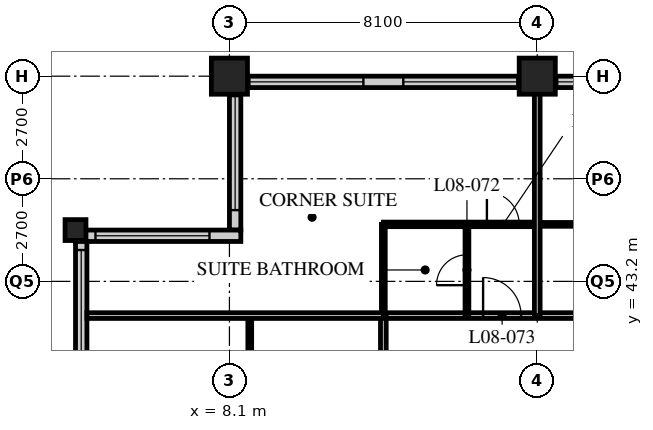
"""IFC4 building model, lengths in metres.
Left out: names, types, materials, properties, quantities, classifications, styles, units other than length and angle.
Written with IfcOpenShell. Run it as: python <this file> out.ifc"""

import sys

from ifc_helpers import new_model, si_unit, direction, frame, frame_2d, origin, origin_2d, place, context, subcontext, project, spatial, rectangle, hollow_rectangle, extrude, element, fill, save


model = new_model("IFC4")
c1 = context("Model", 3, precision=1e-05, world=origin(), true_north=direction((0.0, 1.0)))
c2 = subcontext(c1, "Body", "Model", "MODEL_VIEW")
j1 = project(units=[si_unit("LENGTHUNIT", "METRE"), si_unit("PLANEANGLEUNIT", "RADIAN")], contexts=[c1])
p1 = place(None, origin())
s1 = spatial("IfcSite", under=j1, at=p1, CompositionType="ELEMENT")
p2 = place(p1, origin())
s2 = spatial("IfcBuilding", under=s1, at=p2, CompositionType="ELEMENT")
p3 = place(p2, frame((0.0, 0.0, 39.8)))
s3 = spatial("IfcBuildingStorey", under=s2, at=p3, CompositionType="ELEMENT", Elevation=39.8)
p4 = place(p3, frame((4.05, 44.55, 0.0), z_axis=(0.0, 0.0, 1.0), x_axis=(1.0, 0.0, 0.0)))
e1 = element("IfcColumn", 1, at=p4, inside=s3, PredefinedType="COLUMN", context=c2, shape_type="SweptSolid", body=[
    extrude(hollow_rectangle(XDim=0.55, YDim=0.55, WallThickness=0.05, at=origin_2d()), origin(), (0.0, 0.0, 1.0), 3.4),
])
for number, where, z_axis, x_axis in (
    (2, (8.1, 48.6, 0.0), (0.0, 0.0, 1.0), (1.0, 0.0, 0.0)),
    (3, (16.2, 48.6, 0.0), (0.0, 0.0, 1.0), (1.0, 0.0, 0.0)),
):
    element("IfcColumn", number, at=place(p3, frame(where, z_axis=z_axis, x_axis=x_axis)), inside=s3, PredefinedType="COLUMN", context=c2, shape_type="SweptSolid", body=[
        extrude(hollow_rectangle(XDim=0.95, YDim=0.95, WallThickness=0.095, at=origin_2d()), origin(), (0.0, 0.0, 1.0), 3.4),
    ])
p5 = place(p3, frame((48.3, 48.45, 0.0), z_axis=(0.0, 0.0, 1.0), x_axis=(-1.0, 0.0, 0.0)))
e4 = element("IfcWall", 4, at=p5, inside=s3, PredefinedType="SOLIDWALL", context=c2, shape_type="SweptSolid", body=[
    extrude(rectangle(XDim=40.2, YDim=0.3, at=frame_2d((20.1, 0.0))), origin(), (0.0, 0.0, 1.0), 3.19),
])
p6 = place(p5, frame((0.225, 0.0, 0.9)))
e5 = element("IfcOpeningElement", 5, at=p6, cuts=e4, PredefinedType="OPENING", context=c2, shape_type="SweptSolid", body=[
    extrude(rectangle(XDim=3.0, YDim=2.0, at=frame_2d((1.5, 1.0))), frame((0.0, 0.16, 0.0), z_axis=(0.0, -1.0, 0.0), x_axis=(1.0, 0.0, 0.0)), (0.0, 0.0, 1.0), 0.32),
])
p7 = place(p5, frame((4.275, 0.0, 0.9)))
e6 = element("IfcOpeningElement", 6, at=p7, cuts=e4, PredefinedType="OPENING", context=c2, shape_type="SweptSolid", body=[
    extrude(rectangle(XDim=3.0, YDim=2.0, at=frame_2d((1.5, 1.0))), frame((0.0, 0.16, 0.0), z_axis=(0.0, -1.0, 0.0), x_axis=(1.0, 0.0, 0.0)), (0.0, 0.0, 1.0), 0.32),
])
p8 = place(p5, frame((8.325, 0.0, 0.9)))
e7 = element("IfcOpeningElement", 7, at=p8, cuts=e4, PredefinedType="OPENING", context=c2, shape_type="SweptSolid", body=[
    extrude(rectangle(XDim=3.0, YDim=2.0, at=frame_2d((1.5, 1.0))), frame((0.0, 0.16, 0.0), z_axis=(0.0, -1.0, 0.0), x_axis=(1.0, 0.0, 0.0)), (0.0, 0.0, 1.0), 0.32),
])
p9 = place(p5, frame((12.375, 0.0, 0.9)))
e8 = element("IfcOpeningElement", 8, at=p9, cuts=e4, PredefinedType="OPENING", context=c2, shape_type="SweptSolid", body=[
    extrude(rectangle(XDim=3.0, YDim=2.0, at=frame_2d((1.5, 1.0))), frame((0.0, 0.16, 0.0), z_axis=(0.0, -1.0, 0.0), x_axis=(1.0, 0.0, 0.0)), (0.0, 0.0, 1.0), 0.32),
])
p10 = place(p5, frame((16.425, 0.0, 0.9)))
e9 = element("IfcOpeningElement", 9, at=p10, cuts=e4, PredefinedType="OPENING", context=c2, shape_type="SweptSolid", body=[
    extrude(rectangle(XDim=3.0, YDim=2.0, at=frame_2d((1.5, 1.0))), frame((0.0, 0.16, 0.0), z_axis=(0.0, -1.0, 0.0), x_axis=(1.0, 0.0, 0.0)), (0.0, 0.0, 1.0), 0.32),
])
p11 = place(p5, frame((20.475, 0.0, 0.9)))
e10 = element("IfcOpeningElement", 10, at=p11, cuts=e4, PredefinedType="OPENING", context=c2, shape_type="SweptSolid", body=[
    extrude(rectangle(XDim=3.0, YDim=2.0, at=frame_2d((1.5, 1.0))), frame((0.0, 0.16, 0.0), z_axis=(0.0, -1.0, 0.0), x_axis=(1.0, 0.0, 0.0)), (0.0, 0.0, 1.0), 0.32),
])
p12 = place(p5, frame((24.525, 0.0, 0.9)))
e11 = element("IfcOpeningElement", 11, at=p12, cuts=e4, PredefinedType="OPENING", context=c2, shape_type="SweptSolid", body=[
    extrude(rectangle(XDim=3.0, YDim=2.0, at=frame_2d((1.5, 1.0))), frame((0.0, 0.16, 0.0), z_axis=(0.0, -1.0, 0.0), x_axis=(1.0, 0.0, 0.0)), (0.0, 0.0, 1.0), 0.32),
])
p13 = place(p5, frame((28.575, 0.0, 0.9)))
e12 = element("IfcOpeningElement", 12, at=p13, cuts=e4, PredefinedType="OPENING", context=c2, shape_type="SweptSolid", body=[
    extrude(rectangle(XDim=3.0, YDim=2.0, at=frame_2d((1.5, 1.0))), frame((0.0, 0.16, 0.0), z_axis=(0.0, -1.0, 0.0), x_axis=(1.0, 0.0, 0.0)), (0.0, 0.0, 1.0), 0.32),
])
p14 = place(p5, frame((32.625, 0.0, 0.9)))
e13 = element("IfcOpeningElement", 13, at=p14, cuts=e4, PredefinedType="OPENING", context=c2, shape_type="SweptSolid", body=[
    extrude(rectangle(XDim=3.0, YDim=2.0, at=frame_2d((1.5, 1.0))), frame((0.0, 0.16, 0.0), z_axis=(0.0, -1.0, 0.0), x_axis=(1.0, 0.0, 0.0)), (0.0, 0.0, 1.0), 0.32),
])
p15 = place(p5, frame((36.675, 0.0, 0.9)))
e14 = element("IfcOpeningElement", 14, at=p15, cuts=e4, PredefinedType="OPENING", context=c2, shape_type="SweptSolid", body=[
    extrude(rectangle(XDim=3.0, YDim=2.0, at=frame_2d((1.5, 1.0))), frame((0.0, 0.16, 0.0), z_axis=(0.0, -1.0, 0.0), x_axis=(1.0, 0.0, 0.0)), (0.0, 0.0, 1.0), 0.32),
])
p16 = place(p3, frame((8.25, 48.3, 0.0), z_axis=(0.0, 0.0, 1.0), x_axis=(0.0, -1.0, 0.0)))
e15 = element("IfcWall", 15, at=p16, inside=s3, PredefinedType="SOLIDWALL", context=c2, shape_type="SweptSolid", body=[
    extrude(rectangle(XDim=3.75, YDim=0.3, at=frame_2d((1.875, 0.0))), origin(), (0.0, 0.0, 1.0), 3.19),
])
p17 = place(p16, frame((0.225, 0.0, 0.9)))
e16 = element("IfcOpeningElement", 16, at=p17, cuts=e15, PredefinedType="OPENING", context=c2, shape_type="SweptSolid", body=[
    extrude(rectangle(XDim=3.0, YDim=1.5, at=frame_2d((1.5, 0.75))), frame((0.0, 0.16, 0.0), z_axis=(0.0, -1.0, 0.0), x_axis=(1.0, 0.0, 0.0)), (0.0, 0.0, 1.0), 0.32),
])
p18 = place(p3, frame((8.4, 44.4, 0.0), z_axis=(0.0, 0.0, 1.0), x_axis=(-1.0, 0.0, 0.0)))
e17 = element("IfcWall", 17, at=p18, inside=s3, PredefinedType="SOLIDWALL", context=c2, shape_type="SweptSolid", body=[
    extrude(rectangle(XDim=4.35, YDim=0.3, at=frame_2d((2.175, 0.0))), origin(), (0.0, 0.0, 1.0), 3.19),
])
p19 = place(p18, frame((0.825, 0.0, 0.9)))
e18 = element("IfcOpeningElement", 18, at=p19, cuts=e17, PredefinedType="OPENING", context=c2, shape_type="SweptSolid", body=[
    extrude(rectangle(XDim=3.0, YDim=1.5, at=frame_2d((1.5, 0.75))), frame((0.0, 0.16, 0.0), z_axis=(0.0, -1.0, 0.0), x_axis=(1.0, 0.0, 0.0)), (0.0, 0.0, 1.0), 0.32),
])
p20 = place(p3, frame((4.2, 44.25, 0.0), z_axis=(0.0, 0.0, 1.0), x_axis=(0.0, -1.0, 0.0)))
e19 = element("IfcWall", 19, at=p20, inside=s3, PredefinedType="SOLIDWALL", context=c2, shape_type="SweptSolid", body=[
    extrude(rectangle(XDim=3.75, YDim=0.3, at=frame_2d((1.875, 0.0))), origin(), (0.0, 0.0, 1.0), 3.19),
])
p21 = place(p20, frame((0.225, 0.0, 0.9)))
e20 = element("IfcOpeningElement", 20, at=p21, cuts=e19, PredefinedType="OPENING", context=c2, shape_type="SweptSolid", body=[
    extrude(rectangle(XDim=3.0, YDim=1.5, at=frame_2d((1.5, 0.75))), frame((0.0, 0.16, 0.0), z_axis=(0.0, -1.0, 0.0), x_axis=(1.0, 0.0, 0.0)), (0.0, 0.0, 1.0), 0.32),
])
p22 = place(p3, frame((12.15, 42.3, 0.0), z_axis=(0.0, 0.0, 1.0), x_axis=(1.0, 0.0, 0.0)))
e21 = element("IfcWall", 21, at=p22, inside=s3, PredefinedType="PARTITIONING", context=c2, shape_type="SweptSolid", body=[
    extrude(rectangle(XDim=32.4, YDim=0.15, at=frame_2d((16.2, 0.0))), origin(), (0.0, 0.0, 1.0), 3.19),
])
p23 = place(p22, frame((6.5, 0.0, 0.0)))
e22 = element("IfcOpeningElement", 22, at=p23, cuts=e21, PredefinedType="OPENING", context=c2, shape_type="SweptSolid", body=[
    extrude(rectangle(XDim=1.0, YDim=2.1, at=frame_2d((0.5, 1.05))), frame((0.0, 0.085, 0.0), z_axis=(0.0, -1.0, 0.0), x_axis=(1.0, 0.0, 0.0)), (0.0, 0.0, 1.0), 0.17),
])
p24 = place(p22, frame((8.4, 0.0, 0.0)))
e23 = element("IfcOpeningElement", 23, at=p24, cuts=e21, PredefinedType="OPENING", context=c2, shape_type="SweptSolid", body=[
    extrude(rectangle(XDim=1.0, YDim=2.1, at=frame_2d((0.5, 1.05))), frame((0.0, 0.085, 0.0), z_axis=(0.0, -1.0, 0.0), x_axis=(1.0, 0.0, 0.0)), (0.0, 0.0, 1.0), 0.17),
])
p25 = place(p22, frame((14.6, 0.0, 0.0)))
e24 = element("IfcOpeningElement", 24, at=p25, cuts=e21, PredefinedType="OPENING", context=c2, shape_type="SweptSolid", body=[
    extrude(rectangle(XDim=1.0, YDim=2.1, at=frame_2d((0.5, 1.05))), frame((0.0, 0.085, 0.0), z_axis=(0.0, -1.0, 0.0), x_axis=(1.0, 0.0, 0.0)), (0.0, 0.0, 1.0), 0.17),
])
p26 = place(p22, frame((18.65, 0.0, 0.0)))
e25 = element("IfcOpeningElement", 25, at=p26, cuts=e21, PredefinedType="OPENING", context=c2, shape_type="SweptSolid", body=[
    extrude(rectangle(XDim=1.0, YDim=2.1, at=frame_2d((0.5, 1.05))), frame((0.0, 0.085, 0.0), z_axis=(0.0, -1.0, 0.0), x_axis=(1.0, 0.0, 0.0)), (0.0, 0.0, 1.0), 0.17),
])
p27 = place(p22, frame((23.0, 0.0, 0.0)))
e26 = element("IfcOpeningElement", 26, at=p27, cuts=e21, PredefinedType="OPENING", context=c2, shape_type="SweptSolid", body=[
    extrude(rectangle(XDim=1.0, YDim=2.1, at=frame_2d((0.5, 1.05))), frame((0.0, 0.085, 0.0), z_axis=(0.0, -1.0, 0.0), x_axis=(1.0, 0.0, 0.0)), (0.0, 0.0, 1.0), 0.17),
])
p28 = place(p22, frame((26.75, 0.0, 0.0)))
e27 = element("IfcOpeningElement", 27, at=p28, cuts=e21, PredefinedType="OPENING", context=c2, shape_type="SweptSolid", body=[
    extrude(rectangle(XDim=1.0, YDim=2.1, at=frame_2d((0.5, 1.05))), frame((0.0, 0.085, 0.0), z_axis=(0.0, -1.0, 0.0), x_axis=(1.0, 0.0, 0.0)), (0.0, 0.0, 1.0), 0.17),
])
p29 = place(p22, frame((28.775, 0.0, 0.0)))
e28 = element("IfcOpeningElement", 28, at=p29, cuts=e21, PredefinedType="OPENING", context=c2, shape_type="SweptSolid", body=[
    extrude(rectangle(XDim=1.0, YDim=2.1, at=frame_2d((0.5, 1.05))), frame((0.0, 0.085, 0.0), z_axis=(0.0, -1.0, 0.0), x_axis=(1.0, 0.0, 0.0)), (0.0, 0.0, 1.0), 0.17),
])
p30 = place(p22, frame((2.625, 0.0, 0.0)))
e29 = element("IfcOpeningElement", 29, at=p30, cuts=e21, PredefinedType="OPENING", context=c2, shape_type="SweptSolid", body=[
    extrude(rectangle(XDim=1.0, YDim=2.1, at=frame_2d((0.5, 1.05))), frame((0.0, 0.085, 0.0), z_axis=(0.0, -1.0, 0.0), x_axis=(1.0, 0.0, 0.0)), (0.0, 0.0, 1.0), 0.17),
])
p31 = place(p3, frame((12.15, 16.2, 0.0), z_axis=(0.0, 0.0, 1.0), x_axis=(0.0, 1.0, 0.0)))
e30 = element("IfcWall", 30, at=p31, inside=s3, PredefinedType="PARTITIONING", context=c2, shape_type="SweptSolid", body=[
    extrude(rectangle(XDim=26.1, YDim=0.15, at=frame_2d((13.05, 0.0))), origin(), (0.0, 0.0, 1.0), 3.19),
])
p32 = place(p31, frame((2.75, 0.0, 0.0)))
e31 = element("IfcOpeningElement", 31, at=p32, cuts=e30, PredefinedType="OPENING", context=c2, shape_type="SweptSolid", body=[
    extrude(rectangle(XDim=1.0, YDim=2.1, at=frame_2d((0.5, 1.05))), frame((0.0, 0.085, 0.0), z_axis=(0.0, -1.0, 0.0), x_axis=(1.0, 0.0, 0.0)), (0.0, 0.0, 1.0), 0.17),
])
p33 = place(p31, frame((4.35, 0.0, 0.0)))
e32 = element("IfcOpeningElement", 32, at=p33, cuts=e30, PredefinedType="OPENING", context=c2, shape_type="SweptSolid", body=[
    extrude(rectangle(XDim=1.0, YDim=2.1, at=frame_2d((0.5, 1.05))), frame((0.0, 0.085, 0.0), z_axis=(0.0, -1.0, 0.0), x_axis=(1.0, 0.0, 0.0)), (0.0, 0.0, 1.0), 0.17),
])
p34 = place(p31, frame((10.55, 0.0, 0.0)))
e33 = element("IfcOpeningElement", 33, at=p34, cuts=e30, PredefinedType="OPENING", context=c2, shape_type="SweptSolid", body=[
    extrude(rectangle(XDim=1.0, YDim=2.1, at=frame_2d((0.5, 1.05))), frame((0.0, 0.085, 0.0), z_axis=(0.0, -1.0, 0.0), x_axis=(1.0, 0.0, 0.0)), (0.0, 0.0, 1.0), 0.17),
])
p35 = place(p31, frame((12.45, 0.0, 0.0)))
e34 = element("IfcOpeningElement", 34, at=p35, cuts=e30, PredefinedType="OPENING", context=c2, shape_type="SweptSolid", body=[
    extrude(rectangle(XDim=1.0, YDim=2.1, at=frame_2d((0.5, 1.05))), frame((0.0, 0.085, 0.0), z_axis=(0.0, -1.0, 0.0), x_axis=(1.0, 0.0, 0.0)), (0.0, 0.0, 1.0), 0.17),
])
p36 = place(p31, frame((18.65, 0.0, 0.0)))
e35 = element("IfcOpeningElement", 35, at=p36, cuts=e30, PredefinedType="OPENING", context=c2, shape_type="SweptSolid", body=[
    extrude(rectangle(XDim=1.0, YDim=2.1, at=frame_2d((0.5, 1.05))), frame((0.0, 0.085, 0.0), z_axis=(0.0, -1.0, 0.0), x_axis=(1.0, 0.0, 0.0)), (0.0, 0.0, 1.0), 0.17),
])
p37 = place(p31, frame((22.65, 0.0, 0.0)))
e36 = element("IfcOpeningElement", 36, at=p37, cuts=e30, PredefinedType="OPENING", context=c2, shape_type="SweptSolid", body=[
    extrude(rectangle(XDim=1.0, YDim=2.1, at=frame_2d((0.5, 1.05))), frame((0.0, 0.085, 0.0), z_axis=(0.0, -1.0, 0.0), x_axis=(1.0, 0.0, 0.0)), (0.0, 0.0, 1.0), 0.17),
])
for number, where, z_axis, x_axis in (
    (37, (16.2, 44.7, 0.0), (0.0, 0.0, 1.0), (1.0, 0.0, 0.0)),
    (38, (8.635, 40.0, 0.0), (0.0, 0.0, 1.0), (0.0, 1.0, 0.0)),
):
    element("IfcWall", number, at=place(p3, frame(where, z_axis=z_axis, x_axis=x_axis)), inside=s3, PredefinedType="PARTITIONING", context=c2, shape_type="SweptSolid", body=[
        extrude(rectangle(XDim=2.3, YDim=0.1, at=frame_2d((1.15, 0.0))), origin(), (0.0, 0.0, 1.0), 3.19),
    ])
p38 = place(p3, frame((12.15, 44.7, 0.0), z_axis=(0.0, 0.0, 1.0), x_axis=(1.0, 0.0, 0.0)))
e39 = element("IfcWall", 39, at=p38, inside=s3, PredefinedType="PARTITIONING", context=c2, shape_type="SweptSolid", body=[
    extrude(rectangle(XDim=4.05, YDim=0.12, at=frame_2d((2.025, 0.0))), origin(), (0.0, 0.0, 1.0), 3.19),
])
p39 = place(p38, frame((2.725, 0.0, 0.0)))
e40 = element("IfcOpeningElement", 40, at=p39, cuts=e39, PredefinedType="OPENING", context=c2, shape_type="SweptSolid", body=[
    extrude(rectangle(XDim=0.85, YDim=2.1, at=frame_2d((0.425, 1.05))), frame((0.0, 0.07, 0.0), z_axis=(0.0, -1.0, 0.0), x_axis=(1.0, 0.0, 0.0)), (0.0, 0.0, 1.0), 0.14),
])
p40 = place(p3, frame((14.35, 42.3, 0.0), z_axis=(0.0, 0.0, 1.0), x_axis=(0.0, 1.0, 0.0)))
e41 = element("IfcWall", 41, at=p40, inside=s3, PredefinedType="PARTITIONING", context=c2, shape_type="SweptSolid", body=[
    extrude(rectangle(XDim=2.4, YDim=0.1, at=frame_2d((1.2, 0.0))), origin(), (0.0, 0.0, 1.0), 3.19),
])
p41 = place(p40, frame((0.8, 0.0, 0.0)))
e42 = element("IfcOpeningElement", 42, at=p41, cuts=e41, PredefinedType="OPENING", context=c2, shape_type="SweptSolid", body=[
    extrude(rectangle(XDim=0.8, YDim=2.1, at=frame_2d((0.4, 1.05))), frame((0.0, 0.06, 0.0), z_axis=(0.0, -1.0, 0.0), x_axis=(1.0, 0.0, 0.0)), (0.0, 0.0, 1.0), 0.12),
])
p42 = place(p3, frame((12.15, 42.3, 0.0), z_axis=(0.0, 0.0, 1.0), x_axis=(0.0, 1.0, 0.0)))
e43 = element("IfcWall", 43, at=p42, inside=s3, PredefinedType="PARTITIONING", context=c2, shape_type="SweptSolid", body=[
    extrude(rectangle(XDim=2.4, YDim=0.1, at=frame_2d((1.2, 0.0))), origin(), (0.0, 0.0, 1.0), 3.19),
])
p43 = place(p3, frame((4.35, 42.3, 0.0), z_axis=(0.0, 0.0, 1.0), x_axis=(1.0, 0.0, 0.0)))
e44 = element("IfcWall", 44, at=p43, inside=s3, PredefinedType="PARTITIONING", context=c2, shape_type="SweptSolid", body=[
    extrude(rectangle(XDim=7.8, YDim=0.15, at=frame_2d((3.9, 0.0))), origin(), (0.0, 0.0, 1.0), 3.19),
])
p44 = place(p3, frame((16.2, 42.3, 0.0), z_axis=(0.0, 0.0, 1.0), x_axis=(0.0, 1.0, 0.0)))
e45 = element("IfcWall", 45, at=p44, inside=s3, PredefinedType="PARTITIONING", context=c2, shape_type="SweptSolid", body=[
    extrude(rectangle(XDim=6.0, YDim=0.15, at=frame_2d((3.0, 0.0))), origin(), (0.0, 0.0, 1.0), 2.578),
])
p45 = place(p13, origin())
e46 = element("IfcWindow", 46, at=p45, inside=s3, PartitioningType="SINGLE_PANEL", PredefinedType="WINDOW", context=c2, shape_type="SweptSolid", body=[
    extrude(rectangle(XDim=3.0, YDim=2.0, at=frame_2d((1.5, 1.0))), frame((0.0, 0.03, 0.0), z_axis=(0.0, -1.0, 0.0), x_axis=(1.0, 0.0, 0.0)), (0.0, 0.0, 1.0), 0.06),
])
fill(e12, e46)
p46 = place(p14, origin())
e47 = element("IfcWindow", 47, at=p46, inside=s3, PartitioningType="SINGLE_PANEL", PredefinedType="WINDOW", context=c2, shape_type="SweptSolid", body=[
    extrude(rectangle(XDim=3.0, YDim=2.0, at=frame_2d((1.5, 1.0))), frame((0.0, 0.03, 0.0), z_axis=(0.0, -1.0, 0.0), x_axis=(1.0, 0.0, 0.0)), (0.0, 0.0, 1.0), 0.06),
])
fill(e13, e47)
p47 = place(p15, origin())
e48 = element("IfcWindow", 48, at=p47, inside=s3, PartitioningType="SINGLE_PANEL", PredefinedType="WINDOW", context=c2, shape_type="SweptSolid", body=[
    extrude(rectangle(XDim=3.0, YDim=2.0, at=frame_2d((1.5, 1.0))), frame((0.0, 0.03, 0.0), z_axis=(0.0, -1.0, 0.0), x_axis=(1.0, 0.0, 0.0)), (0.0, 0.0, 1.0), 0.06),
])
fill(e14, e48)
p48 = place(p17, origin())
e49 = element("IfcWindow", 49, at=p48, inside=s3, PartitioningType="SINGLE_PANEL", PredefinedType="WINDOW", context=c2, shape_type="SweptSolid", body=[
    extrude(rectangle(XDim=3.0, YDim=1.5, at=frame_2d((1.5, 0.75))), frame((0.0, 0.03, 0.0), z_axis=(0.0, -1.0, 0.0), x_axis=(1.0, 0.0, 0.0)), (0.0, 0.0, 1.0), 0.06),
])
fill(e16, e49)
p49 = place(p19, origin())
e50 = element("IfcWindow", 50, at=p49, inside=s3, PartitioningType="SINGLE_PANEL", PredefinedType="WINDOW", context=c2, shape_type="SweptSolid", body=[
    extrude(rectangle(XDim=3.0, YDim=1.5, at=frame_2d((1.5, 0.75))), frame((0.0, 0.03, 0.0), z_axis=(0.0, -1.0, 0.0), x_axis=(1.0, 0.0, 0.0)), (0.0, 0.0, 1.0), 0.06),
])
fill(e18, e50)
p50 = place(p21, origin())
e51 = element("IfcWindow", 51, at=p50, inside=s3, PartitioningType="SINGLE_PANEL", PredefinedType="WINDOW", context=c2, shape_type="SweptSolid", body=[
    extrude(rectangle(XDim=3.0, YDim=1.5, at=frame_2d((1.5, 0.75))), frame((0.0, 0.03, 0.0), z_axis=(0.0, -1.0, 0.0), x_axis=(1.0, 0.0, 0.0)), (0.0, 0.0, 1.0), 0.06),
])
fill(e20, e51)
p51 = place(p41, origin())
e52 = element("IfcDoor", 52, at=p51, inside=s3, OperationType="SINGLE_SWING_LEFT", PredefinedType="DOOR", context=c2, shape_type="SweptSolid", body=[
    extrude(rectangle(XDim=0.8, YDim=2.1, at=frame_2d((0.4, 1.05))), frame((0.0, 0.025, 0.0), z_axis=(0.0, -1.0, 0.0), x_axis=(1.0, 0.0, 0.0)), (0.0, 0.0, 1.0), 0.05),
])
fill(e42, e52)
p52 = place(p30, origin())
e53 = element("IfcDoor", 53, at=p52, inside=s3, OperationType="SINGLE_SWING_LEFT", PredefinedType="DOOR", context=c2, shape_type="SweptSolid", body=[
    extrude(rectangle(XDim=1.0, YDim=2.1, at=frame_2d((0.5, 1.05))), frame((0.0, 0.025, 0.0), z_axis=(0.0, -1.0, 0.0), x_axis=(1.0, 0.0, 0.0)), (0.0, 0.0, 1.0), 0.05),
])
fill(e29, e53)
p53 = place(p39, origin())
e54 = element("IfcDoor", 54, at=p53, inside=s3, OperationType="SINGLE_SWING_LEFT", PredefinedType="DOOR", context=c2, shape_type="SweptSolid", body=[
    extrude(rectangle(XDim=0.85, YDim=2.1, at=frame_2d((0.425, 1.05))), frame((0.0, 0.025, 0.0), z_axis=(0.0, -1.0, 0.0), x_axis=(1.0, 0.0, 0.0)), (0.0, 0.0, 1.0), 0.05),
])
fill(e40, e54)
save(model, sys.argv[1])
